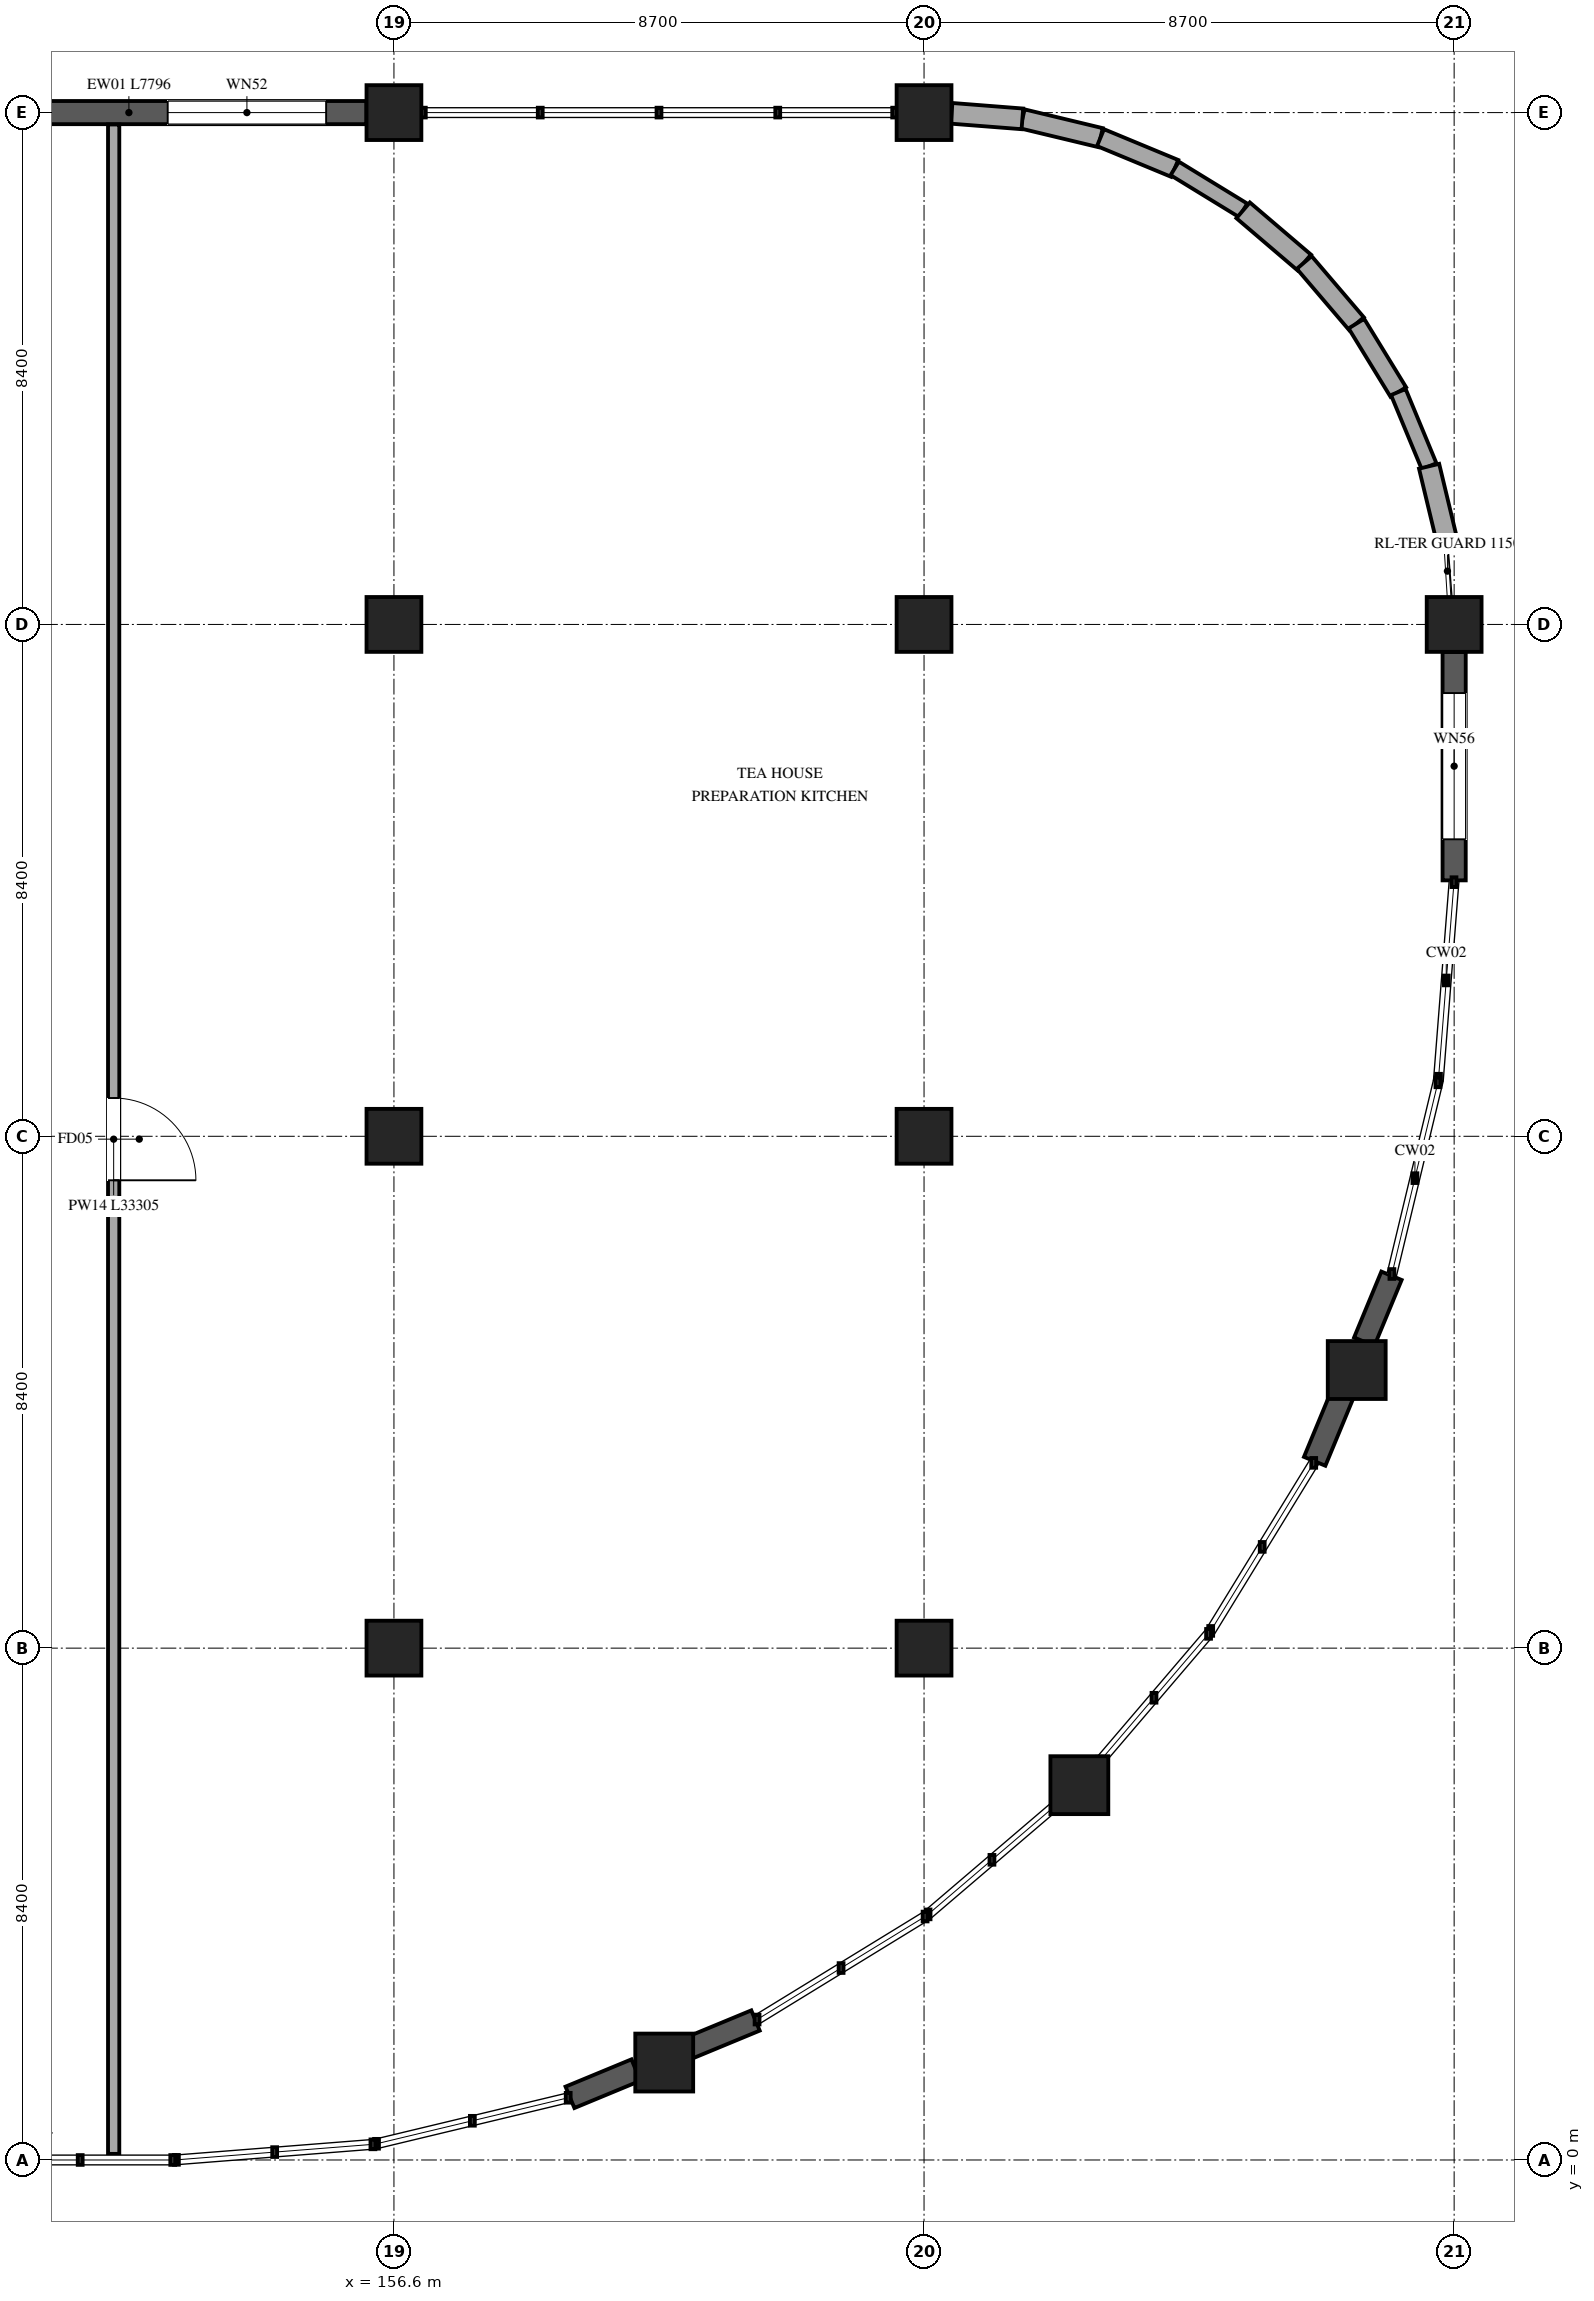
"""IFC4 building model, lengths in metres.
Left out: names, types, materials, properties, quantities, classifications, styles, units other than length and angle.
Written with IfcOpenShell. Run it as: python <this file> out.ifc"""

import sys

from ifc_helpers import new_model, si_unit, direction, frame, frame_2d, origin, origin_2d, place, context, subcontext, project, spatial, rectangle, circle, extrude, element, fill, save


model = new_model("IFC4")
c1 = context("Model", 3, precision=1e-05, world=origin(), true_north=direction((0.0, 1.0)))
c2 = subcontext(c1, "Body", "Model", "MODEL_VIEW")
j1 = project(units=[si_unit("LENGTHUNIT", "METRE"), si_unit("PLANEANGLEUNIT", "RADIAN")], contexts=[c1])
p1 = place(None, origin())
s1 = spatial("IfcSite", under=j1, at=p1, CompositionType="ELEMENT")
p2 = place(p1, origin())
s2 = spatial("IfcBuilding", under=s1, at=p2, CompositionType="ELEMENT")
p3 = place(p2, frame((0.0, 0.0, 6.0)))
s3 = spatial("IfcBuildingStorey", under=s2, at=p3, CompositionType="ELEMENT", Elevation=6.0)
for number, where, z_axis, x_axis in (
    (1, (156.6, 8.4, 0.0), (0.0, 0.0, 1.0), (1.0, 0.0, 0.0)),
    (2, (156.6, 16.8, 0.0), (0.0, 0.0, 1.0), (1.0, 0.0, 0.0)),
    (3, (156.6, 25.2, 0.0), (0.0, 0.0, 1.0), (1.0, 0.0, 0.0)),
    (4, (156.6, 33.6, 0.0), (0.0, 0.0, 1.0), (1.0, 0.0, 0.0)),
    (5, (165.3, 8.4, 0.0), (0.0, 0.0, 1.0), (1.0, 0.0, 0.0)),
    (6, (165.3, 16.8, 0.0), (0.0, 0.0, 1.0), (1.0, 0.0, 0.0)),
    (7, (165.3, 25.2, 0.0), (0.0, 0.0, 1.0), (1.0, 0.0, 0.0)),
    (8, (165.3, 33.6, 0.0), (0.0, 0.0, 1.0), (1.0, 0.0, 0.0)),
    (9, (174.0, 25.2, 0.0), (0.0, 0.0, 1.0), (1.0, 0.0, 0.0)),
):
    element("IfcColumn", number, at=place(p3, frame(where, z_axis=z_axis, x_axis=x_axis)), inside=s3, PredefinedType="COLUMN", context=c2, shape_type="SweptSolid", body=[
        extrude(rectangle(XDim=0.9, YDim=0.9, at=origin_2d()), origin(), (0.0, 0.0, 1.0), 5.4),
    ])
for number, where, z_axis, x_axis in (
    (10, (161.036, 1.599, 0.0), (0.0, 0.0, 1.0), (1.0, 0.0, 0.0)),
    (11, (167.849, 6.151, 0.0), (0.0, 0.0, 1.0), (1.0, 0.0, 0.0)),
    (12, (172.401, 12.964, 0.0), (0.0, 0.0, 1.0), (1.0, 0.0, 0.0)),
):
    element("IfcColumn", number, at=place(p3, frame(where, z_axis=z_axis, x_axis=x_axis)), inside=s3, PredefinedType="PILASTER", context=c2, shape_type="SweptSolid", body=[
        extrude(circle(Radius=0.475, at=origin_2d()), origin(), (0.0, 0.0, 1.0), 5.4),
    ])
p4 = place(p3, frame((166.914, 33.497, 0.0), z_axis=(0.0, 0.0, 1.0), x_axis=(0.972313298303, -0.233681085976, 0.0)))
e13 = element("IfcWall", 13, at=p4, inside=s3, PredefinedType="STANDARD", context=c2, shape_type="SweptSolid", body=[
    extrude(rectangle(XDim=1.319, YDim=0.32, at=frame_2d((0.659, 0.0))), origin(), (0.0, 0.0, 1.0), 5.09),
])
p5 = place(p3, frame((168.196, 33.189, 0.0), z_axis=(0.0, 0.0, 1.0), x_axis=(0.923782055047, -0.382918679061, 0.0)))
e14 = element("IfcWall", 14, at=p5, inside=s3, PredefinedType="STANDARD", context=c2, shape_type="SweptSolid", body=[
    extrude(rectangle(XDim=1.319, YDim=0.3, at=frame_2d((0.659, 0.0))), origin(), (0.0, 0.0, 1.0), 5.09),
])
p6 = place(p3, frame((169.414, 32.684, 0.0), z_axis=(0.0, 0.0, 1.0), x_axis=(0.852713129378, -0.522379477954, 0.0)))
e15 = element("IfcWall", 15, at=p6, inside=s3, PredefinedType="STANDARD", context=c2, shape_type="SweptSolid", body=[
    extrude(rectangle(XDim=1.317, YDim=0.26, at=frame_2d((0.659, 0.0))), origin(), (0.0, 0.0, 1.0), 5.09),
])
p7 = place(p3, frame((170.537, 31.996, 0.0), z_axis=(0.0, 0.0, 1.0), x_axis=(0.760548893266, -0.649280664237, 0.0)))
e16 = element("IfcWall", 16, at=p7, inside=s3, PredefinedType="STANDARD", context=c2, shape_type="SweptSolid", body=[
    extrude(rectangle(XDim=1.319, YDim=0.34, at=frame_2d((0.659, 0.0))), origin(), (0.0, 0.0, 1.0), 5.09),
])
p8 = place(p3, frame((171.54, 31.14, 0.0), z_axis=(0.0, 0.0, 1.0), x_axis=(0.649173554417, -0.760640319893, 0.0)))
e17 = element("IfcWall", 17, at=p8, inside=s3, PredefinedType="STANDARD", context=c2, shape_type="SweptSolid", body=[
    extrude(rectangle(XDim=1.319, YDim=0.32, at=frame_2d((0.659, 0.0))), origin(), (0.0, 0.0, 1.0), 5.09),
])
p9 = place(p3, frame((172.396, 30.137, 0.0), z_axis=(0.0, 0.0, 1.0), x_axis=(0.522379477954, -0.852713129378, 0.0)))
e18 = element("IfcWall", 18, at=p9, inside=s3, PredefinedType="STANDARD", context=c2, shape_type="SweptSolid", body=[
    extrude(rectangle(XDim=1.317, YDim=0.3, at=frame_2d((0.659, 0.0))), origin(), (0.0, 0.0, 1.0), 5.09),
])
p10 = place(p3, frame((173.084, 29.014, 0.0), z_axis=(0.0, 0.0, 1.0), x_axis=(0.383076676071, -0.923716547568, 0.0)))
e19 = element("IfcWall", 19, at=p10, inside=s3, PredefinedType="STANDARD", context=c2, shape_type="SweptSolid", body=[
    extrude(rectangle(XDim=1.319, YDim=0.26, at=frame_2d((0.659, 0.0))), origin(), (0.0, 0.0, 1.0), 5.09),
])
p11 = place(p3, frame((173.589, 27.796, 0.0), z_axis=(0.0, 0.0, 1.0), x_axis=(0.233506018754, -0.972355356444, 0.0)))
e20 = element("IfcWall", 20, at=p11, inside=s3, PredefinedType="STANDARD", context=c2, shape_type="SweptSolid", body=[
    extrude(rectangle(XDim=1.318, YDim=0.34, at=frame_2d((0.659, 0.0))), origin(), (0.0, 0.0, 1.0), 5.09),
])
p12 = place(p3, frame((174.0, 24.748, 0.0), z_axis=(0.0, 0.0, 1.0), x_axis=(0.0, -1.0, 0.0)))
e21 = element("IfcWall", 21, at=p12, inside=s3, PredefinedType="STANDARD", context=c2, shape_type="SweptSolid", body=[
    extrude(rectangle(XDim=3.748, YDim=0.38, at=frame_2d((1.874, 0.0))), origin(), (0.0, 0.0, 1.0), 5.09),
])
p13 = place(p12, frame((0.674, 0.0, 0.85)))
e22 = element("IfcOpeningElement", 22, at=p13, cuts=e21, PredefinedType="OPENING", context=c2, shape_type="SweptSolid", body=[
    extrude(rectangle(XDim=2.4, YDim=1.65, at=frame_2d((1.2, 0.825))), frame((0.0, 0.2, 0.0), z_axis=(0.0, -1.0, 0.0), x_axis=(1.0, 0.0, 0.0)), (0.0, 0.0, 1.0), 0.4),
])
p14 = place(p3, frame((172.972, 14.511, 0.0), z_axis=(0.0, 0.0, 1.0), x_axis=(-0.382542052981, -0.923938081097, 0.0)))
e23 = element("IfcWall", 23, at=p14, inside=s3, PredefinedType="STANDARD", context=c2, shape_type="SweptSolid", body=[
    extrude(rectangle(XDim=1.171, YDim=0.36, at=frame_2d((0.585, 0.0))), origin(), (0.0, 0.0, 1.0), 5.09),
])
p15 = place(p3, frame((172.159, 12.548, 0.0), z_axis=(0.0, 0.0, 1.0), x_axis=(-0.382542052981, -0.923938081097, 0.0)))
e24 = element("IfcWall", 24, at=p15, inside=s3, PredefinedType="STANDARD", context=c2, shape_type="SweptSolid", body=[
    extrude(rectangle(XDim=1.171, YDim=0.38, at=frame_2d((0.585, 0.0))), origin(), (0.0, 0.0, 1.0), 5.09),
])
p16 = place(p3, frame((162.534, 2.289, 0.0), z_axis=(0.0, 0.0, 1.0), x_axis=(-0.923938081097, -0.382542052981, 0.0)))
e25 = element("IfcWall", 25, at=p16, inside=s3, PredefinedType="STANDARD", context=c2, shape_type="SweptSolid", body=[
    extrude(rectangle(XDim=1.171, YDim=0.36, at=frame_2d((0.585, 0.0))), origin(), (0.0, 0.0, 1.0), 5.09),
])
p17 = place(p3, frame((160.571, 1.476, 0.0), z_axis=(0.0, 0.0, 1.0), x_axis=(-0.923938081097, -0.382542052981, 0.0)))
e26 = element("IfcWall", 26, at=p17, inside=s3, PredefinedType="STANDARD", context=c2, shape_type="SweptSolid", body=[
    extrude(rectangle(XDim=1.171, YDim=0.38, at=frame_2d((0.585, 0.0))), origin(), (0.0, 0.0, 1.0), 5.09),
])
p18 = place(p3, frame((148.352, 33.6, 0.0), z_axis=(0.0, 0.0, 1.0), x_axis=(1.0, 0.0, 0.0)))
e27 = element("IfcWall", 27, at=p18, inside=s3, PredefinedType="STANDARD", context=c2, shape_type="SweptSolid", body=[
    extrude(rectangle(XDim=7.796, YDim=0.38, at=frame_2d((3.898, 0.0))), origin(), (0.0, 0.0, 1.0), 5.09),
])
p19 = place(p18, frame((4.535, 0.0, 0.85)))
e28 = element("IfcOpeningElement", 28, at=p19, cuts=e27, PredefinedType="OPENING", context=c2, shape_type="SweptSolid", body=[
    extrude(rectangle(XDim=2.6, YDim=1.75, at=frame_2d((1.3, 0.875))), frame((0.0, 0.2, 0.0), z_axis=(0.0, -1.0, 0.0), x_axis=(1.0, 0.0, 0.0)), (0.0, 0.0, 1.0), 0.4),
])
p20 = place(p3, frame((165.752, 33.588, 0.0), z_axis=(0.0, 0.0, 1.0), x_axis=(0.996960108053, -0.077913689117, 0.0)))
e29 = element("IfcWall", 29, at=p20, inside=s3, PredefinedType="STANDARD", context=c2, shape_type="SweptSolid", body=[
    extrude(rectangle(XDim=1.166, YDim=0.34, at=frame_2d((0.583, 0.0))), origin(), (0.0, 0.0, 1.0), 5.09),
])
p21 = place(p3, frame((152.0, 33.405, 0.0), z_axis=(0.0, 0.0, 1.0), x_axis=(0.0, -1.0, 0.0)))
e30 = element("IfcWall", 30, at=p21, inside=s3, PredefinedType="PARTITIONING", context=c2, shape_type="SweptSolid", body=[
    extrude(rectangle(XDim=33.305, YDim=0.185, at=frame_2d((16.652, 0.0))), origin(), (0.0, 0.0, 1.0), 4.295),
])
p22 = place(p21, frame((15.977, 0.0, 0.0)))
e31 = element("IfcOpeningElement", 31, at=p22, cuts=e30, PredefinedType="OPENING", context=c2, shape_type="SweptSolid", body=[
    extrude(rectangle(XDim=1.35, YDim=2.2, at=frame_2d((0.675, 1.1))), frame((0.0, 0.103, 0.0), z_axis=(0.0, -1.0, 0.0), x_axis=(1.0, 0.0, 0.0)), (0.0, 0.0, 1.0), 0.205),
])
p23 = place(p13, origin())
e32 = element("IfcWindow", 32, at=p23, inside=s3, PartitioningType="TRIPLE_PANEL_VERTICAL", PredefinedType="WINDOW", context=c2, shape_type="SweptSolid", body=[
    extrude(rectangle(XDim=2.4, YDim=1.65, at=frame_2d((1.2, 0.825))), frame((0.0, 0.03, 0.0), z_axis=(0.0, -1.0, 0.0), x_axis=(1.0, 0.0, 0.0)), (0.0, 0.0, 1.0), 0.06),
])
fill(e22, e32)
p24 = place(p19, origin())
e33 = element("IfcWindow", 33, at=p24, inside=s3, PartitioningType="TRIPLE_PANEL_VERTICAL", PredefinedType="WINDOW", context=c2, shape_type="SweptSolid", body=[
    extrude(rectangle(XDim=2.6, YDim=1.75, at=frame_2d((1.3, 0.875))), frame((0.0, 0.03, 0.0), z_axis=(0.0, -1.0, 0.0), x_axis=(1.0, 0.0, 0.0)), (0.0, 0.0, 1.0), 0.06),
])
fill(e28, e33)
p25 = place(p22, origin())
e34 = element("IfcDoor", 34, at=p25, inside=s3, OperationType="SINGLE_SWING_RIGHT", PredefinedType="DOOR", context=c2, shape_type="SweptSolid", body=[
    extrude(rectangle(XDim=1.35, YDim=2.2, at=frame_2d((0.675, 1.1))), frame((0.0, 0.025, 0.0), z_axis=(0.0, -1.0, 0.0), x_axis=(1.0, 0.0, 0.0)), (0.0, 0.0, 1.0), 0.05),
])
fill(e31, e34)
save(model, sys.argv[1])
